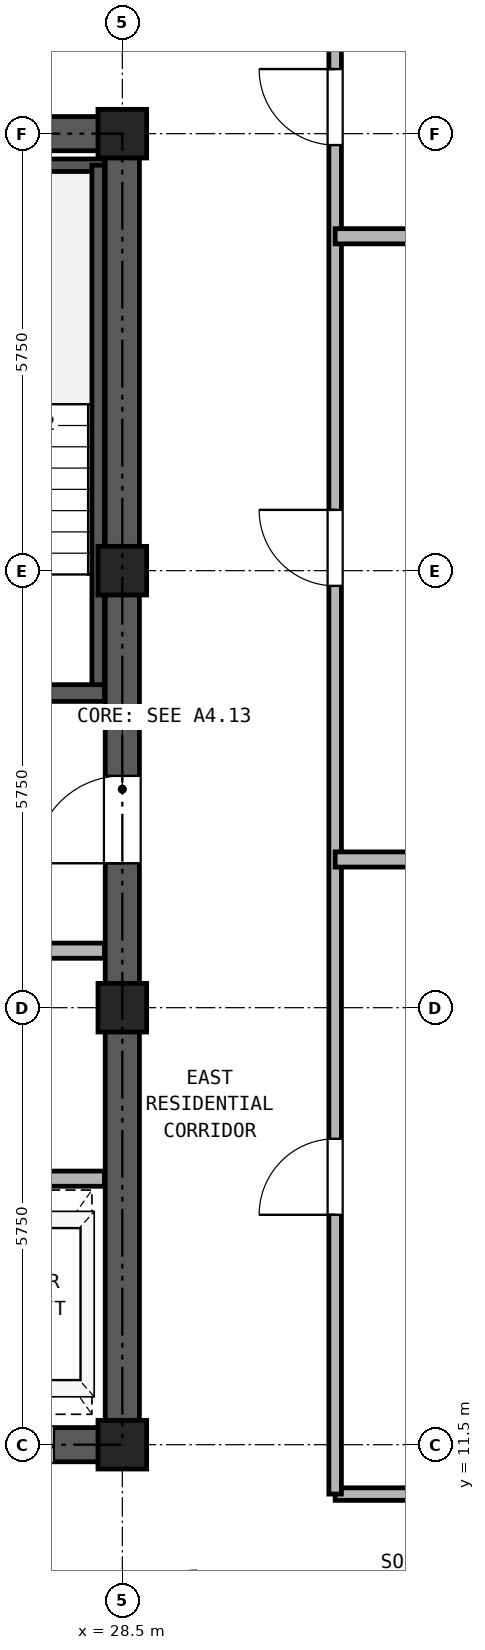
"""IFC4 building model, lengths in metres.
Left out: names, types, materials, properties, quantities, classifications, styles, units other than length and angle.
Written with IfcOpenShell. Run it as: python <this file> out.ifc"""

import sys

from ifc_helpers import new_model, si_unit, direction, frame, frame_2d, origin, origin_2d, place, context, subcontext, project, spatial, rectangle, hollow_rectangle, extrude, source, transform, mapped, element, fill, save


model = new_model("IFC4")
c1 = context("Model", 3, precision=1e-05, world=origin(), true_north=direction((0.0, 1.0)))
c2 = subcontext(c1, "Body", "Model", "MODEL_VIEW")
j1 = project(units=[si_unit("LENGTHUNIT", "METRE"), si_unit("PLANEANGLEUNIT", "RADIAN")], contexts=[c1])
p1 = place(None, origin())
s1 = spatial("IfcSite", under=j1, at=p1, CompositionType="ELEMENT")
p2 = place(p1, origin())
s2 = spatial("IfcBuilding", under=s1, at=p2, CompositionType="ELEMENT")
p3 = place(p2, frame((0.0, 0.0, 199.6)))
s3 = spatial("IfcBuildingStorey", under=s2, at=p3, CompositionType="ELEMENT", Elevation=199.6)
m1 = source(origin(), c2, "Body", "SweptSolid", [
    extrude(hollow_rectangle(XDim=0.64, YDim=0.64, WallThickness=0.035, at=origin_2d()), origin(), (0.0, 0.0, 1.0), 2.95),
])
for number, where, z_axis, x_axis in (
    (1, (28.5, 11.5, 0.0), (0.0, 0.0, 1.0), (1.0, 0.0, 0.0)),
    (2, (28.5, 17.25, 0.0), (0.0, 0.0, 1.0), (1.0, 0.0, 0.0)),
    (3, (28.5, 23.0, 0.0), (0.0, 0.0, 1.0), (1.0, 0.0, 0.0)),
    (4, (28.5, 28.75, 0.0), (0.0, 0.0, 1.0), (1.0, 0.0, 0.0)),
):
    element("IfcColumn", number, at=place(p3, frame(where, z_axis=z_axis, x_axis=x_axis)), inside=s3, PredefinedType="COLUMN", context=c2, shape_type="MappedRepresentation", body=[
        mapped(m1, transform((0.0, 0.0, 0.0), x_axis=(1.0, 0.0, 0.0), y_axis=(0.0, 1.0, 0.0), z_axis=(0.0, 0.0, 1.0), scale=1.0)),
    ])
p4 = place(p3, frame((18.275, 11.5, 0.0), z_axis=(0.0, 0.0, 1.0), x_axis=(1.0, 0.0, 0.0)))
e5 = element("IfcWall", 5, at=p4, inside=s3, PredefinedType="SHEAR", context=c2, shape_type="SweptSolid", body=[
    extrude(rectangle(XDim=10.45, YDim=0.45, at=frame_2d((5.225, 0.0))), origin(), (0.0, 0.0, 1.0), 2.95),
])
p5 = place(p4, frame((1.825, 0.0, 0.0)))
e6 = element("IfcOpeningElement", 6, at=p5, cuts=e5, PredefinedType="OPENING", context=c2, shape_type="SweptSolid", body=[
    extrude(rectangle(XDim=0.95, YDim=2.15, at=frame_2d((0.475, 1.075))), frame((0.0, 0.235, 0.0), z_axis=(0.0, -1.0, 0.0), x_axis=(1.0, 0.0, 0.0)), (0.0, 0.0, 1.0), 0.47),
])
p6 = place(p4, frame((5.325, 0.0, 0.0)))
e7 = element("IfcOpeningElement", 7, at=p6, cuts=e5, PredefinedType="OPENING", context=c2, shape_type="SweptSolid", body=[
    extrude(rectangle(XDim=0.95, YDim=2.15, at=frame_2d((0.475, 1.075))), frame((0.0, 0.235, 0.0), z_axis=(0.0, -1.0, 0.0), x_axis=(1.0, 0.0, 0.0)), (0.0, 0.0, 1.0), 0.47),
])
p7 = place(p4, frame((8.225, 0.0, 0.0)))
e8 = element("IfcOpeningElement", 8, at=p7, cuts=e5, PredefinedType="OPENING", context=c2, shape_type="SweptSolid", body=[
    extrude(rectangle(XDim=1.1, YDim=2.25, at=frame_2d((0.55, 1.125))), frame((0.0, 0.235, 0.0), z_axis=(0.0, -1.0, 0.0), x_axis=(1.0, 0.0, 0.0)), (0.0, 0.0, 1.0), 0.47),
])
p8 = place(p3, frame((18.275, 28.75, 0.0), z_axis=(0.0, 0.0, 1.0), x_axis=(1.0, 0.0, 0.0)))
e9 = element("IfcWall", 9, at=p8, inside=s3, PredefinedType="SHEAR", context=c2, shape_type="SweptSolid", body=[
    extrude(rectangle(XDim=10.45, YDim=0.45, at=frame_2d((5.225, 0.0))), origin(), (0.0, 0.0, 1.0), 2.95),
])
p9 = place(p8, frame((4.105, 0.0, 0.0)))
e10 = element("IfcOpeningElement", 10, at=p9, cuts=e9, PredefinedType="OPENING", context=c2, shape_type="SweptSolid", body=[
    extrude(rectangle(XDim=0.9, YDim=2.05, at=frame_2d((0.45, 1.025))), frame((0.0, 0.235, 0.0), z_axis=(0.0, -1.0, 0.0), x_axis=(1.0, 0.0, 0.0)), (0.0, 0.0, 1.0), 0.47),
])
p10 = place(p8, frame((5.645, 0.0, 0.0)))
e11 = element("IfcOpeningElement", 11, at=p10, cuts=e9, PredefinedType="OPENING", context=c2, shape_type="SweptSolid", body=[
    extrude(rectangle(XDim=0.9, YDim=2.05, at=frame_2d((0.45, 1.025))), frame((0.0, 0.235, 0.0), z_axis=(0.0, -1.0, 0.0), x_axis=(1.0, 0.0, 0.0)), (0.0, 0.0, 1.0), 0.47),
])
p11 = place(p3, frame((28.5, 11.725, 0.0), z_axis=(0.0, 0.0, 1.0), x_axis=(0.0, 1.0, 0.0)))
e12 = element("IfcWall", 12, at=p11, inside=s3, PredefinedType="SHEAR", context=c2, shape_type="SweptSolid", body=[
    extrude(rectangle(XDim=16.8, YDim=0.45, at=frame_2d((8.4, 0.0))), origin(), (0.0, 0.0, 1.0), 2.95),
])
p12 = place(p11, frame((7.425, 0.0, 0.0)))
e13 = element("IfcOpeningElement", 13, at=p12, cuts=e12, PredefinedType="OPENING", context=c2, shape_type="SweptSolid", body=[
    extrude(rectangle(XDim=1.15, YDim=2.2, at=frame_2d((0.575, 1.1))), frame((0.0, 0.235, 0.0), z_axis=(0.0, -1.0, 0.0), x_axis=(1.0, 0.0, 0.0)), (0.0, 0.0, 1.0), 0.47),
])
p13 = place(p3, frame((25.13, 28.335, 0.0), z_axis=(0.0, 0.0, 1.0), x_axis=(1.0, 0.0, 0.0)))
e14 = element("IfcWall", 14, at=p13, inside=s3, PredefinedType="PARTITIONING", context=c2, shape_type="SweptSolid", body=[
    extrude(rectangle(XDim=3.135, YDim=0.165, at=frame_2d((1.567, 0.0))), origin(), (0.0, 0.0, 1.0), 2.95),
])
p14 = place(p3, frame((28.183, 21.39, 0.0), z_axis=(0.0, 0.0, 1.0), x_axis=(0.0, 1.0, 0.0)))
e15 = element("IfcWall", 15, at=p14, inside=s3, PredefinedType="PARTITIONING", context=c2, shape_type="SweptSolid", body=[
    extrude(rectangle(XDim=6.945, YDim=0.165, at=frame_2d((3.473, 0.0))), origin(), (0.0, 0.0, 1.0), 2.95),
])
p15 = place(p3, frame((25.13, 21.39, 0.0), z_axis=(0.0, 0.0, 1.0), x_axis=(1.0, 0.0, 0.0)))
e16 = element("IfcWall", 16, at=p15, inside=s3, PredefinedType="SOLIDWALL", context=c2, shape_type="SweptSolid", body=[
    extrude(rectangle(XDim=3.135, YDim=0.22, at=frame_2d((1.567, 0.0))), origin(), (0.0, 0.0, 1.0), 2.95),
])
p16 = place(p15, frame((0.92, 0.0, 0.0)))
e17 = element("IfcOpeningElement", 17, at=p16, cuts=e16, PredefinedType="OPENING", context=c2, shape_type="SweptSolid", body=[
    extrude(rectangle(XDim=1.15, YDim=2.2, at=frame_2d((0.575, 1.1))), frame((0.0, 0.12, 0.0), z_axis=(0.0, -1.0, 0.0), x_axis=(1.0, 0.0, 0.0)), (0.0, 0.0, 1.0), 0.24),
])
p17 = place(p3, frame((18.735, 18.0, 0.0), z_axis=(0.0, 0.0, 1.0), x_axis=(1.0, 0.0, 0.0)))
e18 = element("IfcWall", 18, at=p17, inside=s3, PredefinedType="PARTITIONING", context=c2, shape_type="SweptSolid", body=[
    extrude(rectangle(XDim=9.53, YDim=0.2, at=frame_2d((4.765, 0.0))), origin(), (0.0, 0.0, 1.0), 2.95),
])
p18 = place(p17, frame((0.515, 0.0, 0.0)))
e19 = element("IfcOpeningElement", 19, at=p18, cuts=e18, PredefinedType="OPENING", context=c2, shape_type="SweptSolid", body=[
    extrude(rectangle(XDim=1.3, YDim=2.3, at=frame_2d((0.65, 1.15))), frame((0.0, 0.11, 0.0), z_axis=(0.0, -1.0, 0.0), x_axis=(1.0, 0.0, 0.0)), (0.0, 0.0, 1.0), 0.22),
])
p19 = place(p17, frame((2.615, 0.0, 0.0)))
e20 = element("IfcOpeningElement", 20, at=p19, cuts=e18, PredefinedType="OPENING", context=c2, shape_type="SweptSolid", body=[
    extrude(rectangle(XDim=1.3, YDim=2.3, at=frame_2d((0.65, 1.15))), frame((0.0, 0.11, 0.0), z_axis=(0.0, -1.0, 0.0), x_axis=(1.0, 0.0, 0.0)), (0.0, 0.0, 1.0), 0.22),
])
p20 = place(p17, frame((7.115, 0.0, 0.0)))
e21 = element("IfcOpeningElement", 21, at=p20, cuts=e18, PredefinedType="OPENING", context=c2, shape_type="SweptSolid", body=[
    extrude(rectangle(XDim=1.0, YDim=2.15, at=frame_2d((0.5, 1.075))), frame((0.0, 0.11, 0.0), z_axis=(0.0, -1.0, 0.0), x_axis=(1.0, 0.0, 0.0)), (0.0, 0.0, 1.0), 0.22),
])
p21 = place(p3, frame((18.735, 15.0, 0.0), z_axis=(0.0, 0.0, 1.0), x_axis=(1.0, 0.0, 0.0)))
e22 = element("IfcWall", 22, at=p21, inside=s3, PredefinedType="PARTITIONING", context=c2, shape_type="SweptSolid", body=[
    extrude(rectangle(XDim=9.53, YDim=0.2, at=frame_2d((4.765, 0.0))), origin(), (0.0, 0.0, 1.0), 2.95),
])
p22 = place(p3, frame((31.3, 10.85, 0.0), z_axis=(0.0, 0.0, 1.0), x_axis=(1.0, 0.0, 0.0)))
e23 = element("IfcWall", 23, at=p22, inside=s3, PredefinedType="PARTITIONING", context=c2, shape_type="SweptSolid", body=[
    extrude(rectangle(XDim=6.9, YDim=0.165, at=frame_2d((3.45, 0.0))), origin(), (0.0, 0.0, 1.0), 2.95),
])
p23 = place(p3, frame((31.3, 10.85, 0.0), z_axis=(0.0, 0.0, 1.0), x_axis=(0.0, 1.0, 0.0)))
e24 = element("IfcWall", 24, at=p23, inside=s3, PredefinedType="PARTITIONING", context=c2, shape_type="SweptSolid", body=[
    extrude(rectangle(XDim=24.29, YDim=0.165, at=frame_2d((12.145, 0.0))), origin(), (0.0, 0.0, 1.0), 2.95),
])
p24 = place(p23, frame((3.675, 0.0, 0.0)))
e25 = element("IfcOpeningElement", 25, at=p24, cuts=e24, PredefinedType="OPENING", context=c2, shape_type="SweptSolid", body=[
    extrude(rectangle(XDim=1.0, YDim=2.15, at=frame_2d((0.5, 1.075))), frame((0.0, 0.093, 0.0), z_axis=(0.0, -1.0, 0.0), x_axis=(1.0, 0.0, 0.0)), (0.0, 0.0, 1.0), 0.185),
])
p25 = place(p23, frame((11.95, 0.0, 0.0)))
e26 = element("IfcOpeningElement", 26, at=p25, cuts=e24, PredefinedType="OPENING", context=c2, shape_type="SweptSolid", body=[
    extrude(rectangle(XDim=1.0, YDim=2.15, at=frame_2d((0.5, 1.075))), frame((0.0, 0.093, 0.0), z_axis=(0.0, -1.0, 0.0), x_axis=(1.0, 0.0, 0.0)), (0.0, 0.0, 1.0), 0.185),
])
p26 = place(p23, frame((17.75, 0.0, 0.0)))
e27 = element("IfcOpeningElement", 27, at=p26, cuts=e24, PredefinedType="OPENING", context=c2, shape_type="SweptSolid", body=[
    extrude(rectangle(XDim=1.0, YDim=2.15, at=frame_2d((0.5, 1.075))), frame((0.0, 0.093, 0.0), z_axis=(0.0, -1.0, 0.0), x_axis=(1.0, 0.0, 0.0)), (0.0, 0.0, 1.0), 0.185),
])
for number, where, z_axis, x_axis in (
    (28, (31.3, 19.2, 0.0), (0.0, 0.0, 1.0), (1.0, 0.0, 0.0)),
    (29, (31.3, 27.4, 0.0), (0.0, 0.0, 1.0), (1.0, 0.0, 0.0)),
):
    element("IfcWall", number, at=place(p3, frame(where, z_axis=z_axis, x_axis=x_axis)), inside=s3, PredefinedType="PARTITIONING", context=c2, shape_type="SweptSolid", body=[
        extrude(rectangle(XDim=10.34, YDim=0.2, at=frame_2d((5.17, 0.0))), origin(), (0.0, 0.0, 1.0), 2.95),
    ])
p27 = place(p12, origin())
e30 = element("IfcDoor", 30, at=p27, inside=s3, OperationType="SINGLE_SWING_LEFT", PredefinedType="DOOR", context=c2, shape_type="SweptSolid", body=[
    extrude(rectangle(XDim=1.15, YDim=2.2, at=frame_2d((0.575, 1.1))), frame((0.0, 0.025, 0.0), z_axis=(0.0, -1.0, 0.0), x_axis=(1.0, 0.0, 0.0)), (0.0, 0.0, 1.0), 0.05),
])
fill(e13, e30)
p28 = place(p7, frame((1.1, 0.0, 0.0), z_axis=(0.0, 0.0, 1.0), x_axis=(-1.0, 0.0, 0.0)))
e31 = element("IfcDoor", 31, at=p28, inside=s3, OperationType="DOUBLE_DOOR_SLIDING", PredefinedType="DOOR", context=c2, shape_type="SweptSolid", body=[
    extrude(rectangle(XDim=1.1, YDim=2.25, at=frame_2d((0.55, 1.125))), frame((0.0, 0.025, 0.0), z_axis=(0.0, -1.0, 0.0), x_axis=(1.0, 0.0, 0.0)), (0.0, 0.0, 1.0), 0.05),
])
fill(e8, e31)
p29 = place(p24, frame((1.0, 0.0, 0.0), z_axis=(0.0, 0.0, 1.0), x_axis=(-1.0, 0.0, 0.0)))
e32 = element("IfcDoor", 32, at=p29, inside=s3, OperationType="SINGLE_SWING_LEFT", PredefinedType="DOOR", context=c2, shape_type="SweptSolid", body=[
    extrude(rectangle(XDim=1.0, YDim=2.15, at=frame_2d((0.5, 1.075))), frame((0.0, 0.025, 0.0), z_axis=(0.0, -1.0, 0.0), x_axis=(1.0, 0.0, 0.0)), (0.0, 0.0, 1.0), 0.05),
])
fill(e25, e32)
p30 = place(p25, frame((1.0, 0.0, 0.0), z_axis=(0.0, 0.0, 1.0), x_axis=(-1.0, 0.0, 0.0)))
e33 = element("IfcDoor", 33, at=p30, inside=s3, OperationType="SINGLE_SWING_RIGHT", PredefinedType="DOOR", context=c2, shape_type="SweptSolid", body=[
    extrude(rectangle(XDim=1.0, YDim=2.15, at=frame_2d((0.5, 1.075))), frame((0.0, 0.025, 0.0), z_axis=(0.0, -1.0, 0.0), x_axis=(1.0, 0.0, 0.0)), (0.0, 0.0, 1.0), 0.05),
])
fill(e26, e33)
p31 = place(p26, frame((1.0, 0.0, 0.0), z_axis=(0.0, 0.0, 1.0), x_axis=(-1.0, 0.0, 0.0)))
e34 = element("IfcDoor", 34, at=p31, inside=s3, OperationType="SINGLE_SWING_RIGHT", PredefinedType="DOOR", context=c2, shape_type="SweptSolid", body=[
    extrude(rectangle(XDim=1.0, YDim=2.15, at=frame_2d((0.5, 1.075))), frame((0.0, 0.025, 0.0), z_axis=(0.0, -1.0, 0.0), x_axis=(1.0, 0.0, 0.0)), (0.0, 0.0, 1.0), 0.05),
])
fill(e27, e34)
save(model, sys.argv[1])
